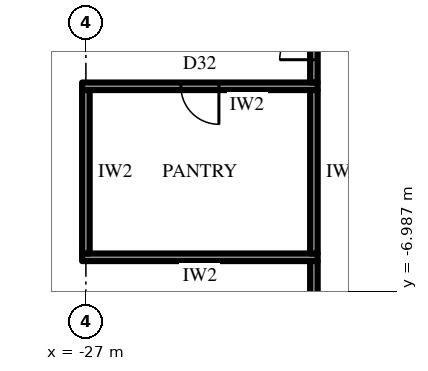
"""IFC4 building model, lengths in metres.
Left out: names, types, materials, properties, quantities, classifications, styles, units other than length and angle.
Written with IfcOpenShell. Run it as: python <this file> out.ifc"""

import sys

from ifc_helpers import new_model, si_unit, direction, frame, frame_2d, origin, place, context, subcontext, project, spatial, rectangle, extrude, element, fill, save


model = new_model("IFC4")
c1 = context("Model", 3, precision=1e-05, world=origin(), true_north=direction((0.0, 1.0)))
c2 = subcontext(c1, "Body", "Model", "MODEL_VIEW")
j1 = project(units=[si_unit("LENGTHUNIT", "METRE"), si_unit("PLANEANGLEUNIT", "RADIAN")], contexts=[c1])
p1 = place(None, origin())
s1 = spatial("IfcSite", under=j1, at=p1, CompositionType="ELEMENT")
p2 = place(p1, origin())
s2 = spatial("IfcBuilding", under=s1, at=p2, CompositionType="ELEMENT")
p3 = place(p2, frame((0.0, 0.0, 57.1)))
s3 = spatial("IfcBuildingStorey", under=s2, at=p3, CompositionType="ELEMENT", Elevation=57.1)
p4 = place(p3, frame((-37.398, -2.925, 0.0), z_axis=(0.0, 0.0, 1.0), x_axis=(0.499999163675, -0.866025886636, 0.0)))
e1 = element("IfcWall", 1, at=p4, inside=s3, PredefinedType="SOLIDWALL", context=c2, shape_type="SweptSolid", body=[
    extrude(rectangle(XDim=32.332, YDim=0.3, at=frame_2d((16.166, 0.0))), origin(), (0.0, 0.0, 1.0), 2.7),
])
p5 = place(p4, frame((1.319, 0.0, 0.6)))
e2 = element("IfcOpeningElement", 2, at=p5, cuts=e1, PredefinedType="OPENING", context=c2, shape_type="SweptSolid", body=[
    extrude(rectangle(XDim=2.75, YDim=1.85, at=frame_2d((1.375, 0.925))), frame((0.0, 0.16, 0.0), z_axis=(0.0, -1.0, 0.0), x_axis=(1.0, 0.0, 0.0)), (0.0, 0.0, 1.0), 0.32),
])
p6 = place(p4, frame((6.708, 0.0, 0.6)))
e3 = element("IfcOpeningElement", 3, at=p6, cuts=e1, PredefinedType="OPENING", context=c2, shape_type="SweptSolid", body=[
    extrude(rectangle(XDim=2.75, YDim=1.85, at=frame_2d((1.375, 0.925))), frame((0.0, 0.16, 0.0), z_axis=(0.0, -1.0, 0.0), x_axis=(1.0, 0.0, 0.0)), (0.0, 0.0, 1.0), 0.32),
])
p7 = place(p4, frame((12.872, 0.0, 0.0)))
e4 = element("IfcOpeningElement", 4, at=p7, cuts=e1, PredefinedType="OPENING", context=c2, shape_type="SweptSolid", body=[
    extrude(rectangle(XDim=1.2, YDim=2.4, at=frame_2d((0.6, 1.2))), frame((0.0, 0.16, 0.0), z_axis=(0.0, -1.0, 0.0), x_axis=(1.0, 0.0, 0.0)), (0.0, 0.0, 1.0), 0.32),
])
p8 = place(p4, frame((17.485, 0.0, 0.6)))
e5 = element("IfcOpeningElement", 5, at=p8, cuts=e1, PredefinedType="OPENING", context=c2, shape_type="SweptSolid", body=[
    extrude(rectangle(XDim=2.75, YDim=1.85, at=frame_2d((1.375, 0.925))), frame((0.0, 0.16, 0.0), z_axis=(0.0, -1.0, 0.0), x_axis=(1.0, 0.0, 0.0)), (0.0, 0.0, 1.0), 0.32),
])
p9 = place(p4, frame((22.874, 0.0, 0.6)))
e6 = element("IfcOpeningElement", 6, at=p9, cuts=e1, PredefinedType="OPENING", context=c2, shape_type="SweptSolid", body=[
    extrude(rectangle(XDim=2.75, YDim=1.85, at=frame_2d((1.375, 0.925))), frame((0.0, 0.16, 0.0), z_axis=(0.0, -1.0, 0.0), x_axis=(1.0, 0.0, 0.0)), (0.0, 0.0, 1.0), 0.32),
])
p10 = place(p4, frame((28.262, 0.0, 0.6)))
e7 = element("IfcOpeningElement", 7, at=p10, cuts=e1, PredefinedType="OPENING", context=c2, shape_type="SweptSolid", body=[
    extrude(rectangle(XDim=2.75, YDim=1.85, at=frame_2d((1.375, 0.925))), frame((0.0, 0.16, 0.0), z_axis=(0.0, -1.0, 0.0), x_axis=(1.0, 0.0, 0.0)), (0.0, 0.0, 1.0), 0.32),
])
p11 = place(p3, frame((-20.9, -1.6, 0.0), z_axis=(0.0, 0.0, 1.0), x_axis=(-1.0, 0.0, 0.0)))
e8 = element("IfcWall", 8, at=p11, inside=s3, PredefinedType="PARTITIONING", context=c2, shape_type="SweptSolid", body=[
    extrude(rectangle(XDim=6.2, YDim=0.2, at=frame_2d((3.1, 0.0))), origin(), (0.0, 0.0, 1.0), 4.0),
])
p12 = place(p11, frame((2.6, 0.0, 0.0)))
e9 = element("IfcOpeningElement", 9, at=p12, cuts=e8, PredefinedType="OPENING", context=c2, shape_type="SweptSolid", body=[
    extrude(rectangle(XDim=1.0, YDim=2.2, at=frame_2d((0.5, 1.1))), frame((0.0, 0.11, 0.0), z_axis=(0.0, -1.0, 0.0), x_axis=(1.0, 0.0, 0.0)), (0.0, 0.0, 1.0), 0.22),
])
p13 = place(p3, frame((-20.9, -6.1, 0.0), z_axis=(0.0, 0.0, 1.0), x_axis=(-1.0, 0.0, 0.0)))
e10 = element("IfcWall", 10, at=p13, inside=s3, PredefinedType="PARTITIONING", context=c2, shape_type="SweptSolid", body=[
    extrude(rectangle(XDim=6.2, YDim=0.2, at=frame_2d((3.1, 0.0))), origin(), (0.0, 0.0, 1.0), 4.0),
])
for number, where, z_axis, x_axis in (
    (11, (-21.0, -1.7, 0.0), (0.0, 0.0, 1.0), (0.0, -1.0, 0.0)),
    (12, (-27.0, -1.7, 0.0), (0.0, 0.0, 1.0), (0.0, -1.0, 0.0)),
):
    element("IfcWall", number, at=place(p3, frame(where, z_axis=z_axis, x_axis=x_axis)), inside=s3, PredefinedType="PARTITIONING", context=c2, shape_type="SweptSolid", body=[
        extrude(rectangle(XDim=4.3, YDim=0.2, at=frame_2d((2.15, 0.0))), origin(), (0.0, 0.0, 1.0), 4.0),
    ])
p14 = place(p3, frame((-21.0, -13.1, 0.0), z_axis=(0.0, 0.0, 1.0), x_axis=(0.0, 1.0, 0.0)))
e13 = element("IfcWall", 13, at=p14, inside=s3, PredefinedType="PARTITIONING", context=c2, shape_type="SweptSolid", body=[
    extrude(rectangle(XDim=6.899, YDim=0.2, at=frame_2d((3.45, 0.0))), origin(), (0.0, 0.0, 1.0), 4.0),
])
p15 = place(p3, frame((-21.0, -1.499, 0.0), z_axis=(0.0, 0.0, 1.0), x_axis=(0.0, 1.0, 0.0)))
e14 = element("IfcWall", 14, at=p15, inside=s3, PredefinedType="PARTITIONING", context=c2, shape_type="SweptSolid", body=[
    extrude(rectangle(XDim=14.599, YDim=0.2, at=frame_2d((7.3, 0.0))), origin(), (0.0, 0.0, 1.0), 4.0),
])
p16 = place(p15, frame((0.599, 0.0, 0.0)))
e15 = element("IfcOpeningElement", 15, at=p16, cuts=e14, PredefinedType="OPENING", context=c2, shape_type="SweptSolid", body=[
    extrude(rectangle(XDim=1.8, YDim=2.4, at=frame_2d((0.9, 1.2))), frame((0.0, 0.11, 0.0), z_axis=(0.0, -1.0, 0.0), x_axis=(1.0, 0.0, 0.0)), (0.0, 0.0, 1.0), 0.22),
])
p17 = place(p12, origin())
e16 = element("IfcDoor", 16, at=p17, inside=s3, OperationType="SINGLE_SWING_RIGHT", PredefinedType="DOOR", context=c2, shape_type="SweptSolid", body=[
    extrude(rectangle(XDim=1.0, YDim=2.2, at=frame_2d((0.5, 1.1))), frame((0.0, 0.025, 0.0), z_axis=(0.0, -1.0, 0.0), x_axis=(1.0, 0.0, 0.0)), (0.0, 0.0, 1.0), 0.05),
])
fill(e9, e16)
p18 = place(p16, origin())
e17 = element("IfcDoor", 17, at=p18, inside=s3, OperationType="DOUBLE_DOOR_SINGLE_SWING", PredefinedType="DOOR", context=c2, shape_type="SweptSolid", body=[
    extrude(rectangle(XDim=1.8, YDim=2.4, at=frame_2d((0.9, 1.2))), frame((0.0, 0.025, 0.0), z_axis=(0.0, -1.0, 0.0), x_axis=(1.0, 0.0, 0.0)), (0.0, 0.0, 1.0), 0.05),
])
fill(e15, e17)
save(model, sys.argv[1])
